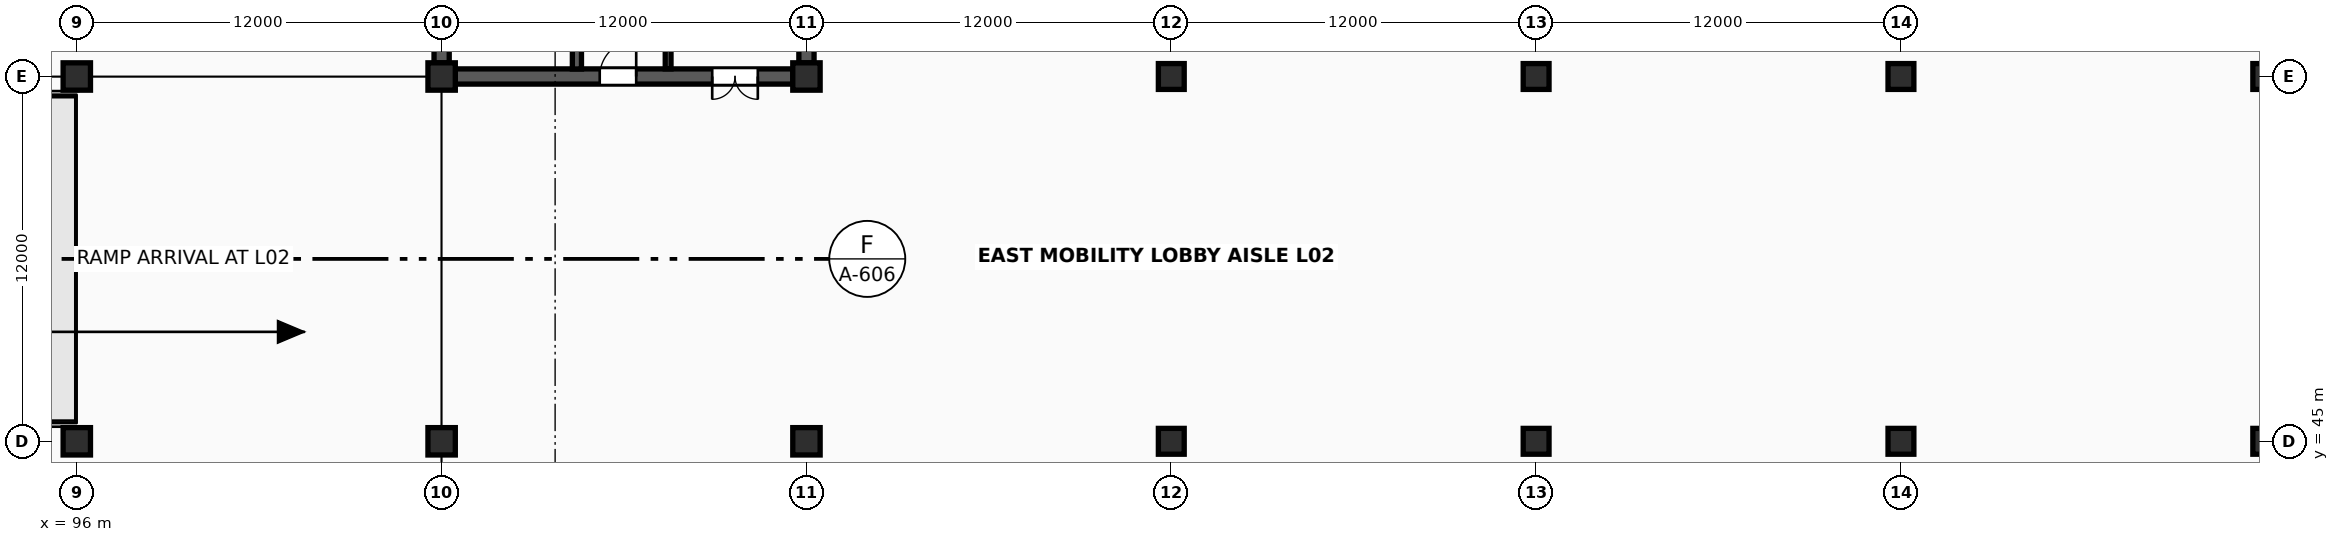
"""IFC4 building model, lengths in metres.
Left out: names, types, materials, properties, quantities, classifications, styles, units other than length and angle.
Written with IfcOpenShell. Run it as: python <this file> out.ifc"""

import sys

from ifc_helpers import new_model, si_unit, direction, frame, frame_2d, origin, origin_2d, place, context, subcontext, project, spatial, rectangle, extrude, element, fill, save


model = new_model("IFC4")
c1 = context("Model", 3, precision=1e-05, world=origin(), true_north=direction((0.0, 1.0)))
c2 = subcontext(c1, "Body", "Model", "MODEL_VIEW")
j1 = project(units=[si_unit("LENGTHUNIT", "METRE"), si_unit("PLANEANGLEUNIT", "RADIAN")], contexts=[c1])
p1 = place(None, origin())
s1 = spatial("IfcSite", under=j1, at=p1, CompositionType="ELEMENT")
p2 = place(p1, origin())
s2 = spatial("IfcBuilding", under=s1, at=p2, CompositionType="ELEMENT")
p3 = place(p2, frame((0.0, 0.0, 9.6)))
s3 = spatial("IfcBuildingStorey", under=s2, at=p3, CompositionType="ELEMENT", Elevation=9.6)
for number, where, z_axis, x_axis in (
    (1, (96.0, 45.0, 0.0), (0.0, 0.0, 1.0), (1.0, 0.0, 0.0)),
    (2, (96.0, 57.0, 0.0), (0.0, 0.0, 1.0), (1.0, 0.0, 0.0)),
    (3, (108.0, 45.0, 0.0), (0.0, 0.0, 1.0), (1.0, 0.0, 0.0)),
    (4, (108.0, 57.0, 0.0), (0.0, 0.0, 1.0), (1.0, 0.0, 0.0)),
    (5, (120.0, 45.0, 0.0), (0.0, 0.0, 1.0), (1.0, 0.0, 0.0)),
    (6, (120.0, 57.0, 0.0), (0.0, 0.0, 1.0), (1.0, 0.0, 0.0)),
):
    element("IfcColumn", number, at=place(p3, frame(where, z_axis=z_axis, x_axis=x_axis)), inside=s3, PredefinedType="COLUMN", context=c2, shape_type="SweptSolid", body=[
        extrude(rectangle(XDim=0.9, YDim=0.9, at=origin_2d()), origin(), (0.0, 0.0, 1.0), 3.8),
    ])
for number, where, z_axis, x_axis in (
    (7, (132.0, 45.0, 0.0), (0.0, 0.0, 1.0), (1.0, 0.0, 0.0)),
    (8, (132.0, 57.0, 0.0), (0.0, 0.0, 1.0), (1.0, 0.0, 0.0)),
    (9, (144.0, 45.0, 0.0), (0.0, 0.0, 1.0), (1.0, 0.0, 0.0)),
    (10, (144.0, 57.0, 0.0), (0.0, 0.0, 1.0), (1.0, 0.0, 0.0)),
    (11, (156.0, 45.0, 0.0), (0.0, 0.0, 1.0), (1.0, 0.0, 0.0)),
    (12, (156.0, 57.0, 0.0), (0.0, 0.0, 1.0), (1.0, 0.0, 0.0)),
    (13, (168.0, 45.0, 0.0), (0.0, 0.0, 1.0), (1.0, 0.0, 0.0)),
    (14, (168.0, 57.0, 0.0), (0.0, 0.0, 1.0), (1.0, 0.0, 0.0)),
):
    element("IfcColumn", number, at=place(p3, frame(where, z_axis=z_axis, x_axis=x_axis)), inside=s3, PredefinedType="COLUMN", context=c2, shape_type="SweptSolid", body=[
        extrude(rectangle(XDim=0.85, YDim=0.85, at=origin_2d()), origin(), (0.0, 0.0, 1.0), 3.8),
    ])
p4 = place(p3, frame((108.447, 57.0, 0.0), z_axis=(0.0, 0.0, 1.0), x_axis=(1.0, 0.0, 0.0)))
e15 = element("IfcWall", 15, at=p4, inside=s3, PredefinedType="SHEAR", context=c2, shape_type="SweptSolid", body=[
    extrude(rectangle(XDim=11.106, YDim=0.5, at=frame_2d((5.553, 0.0))), origin(), (0.0, 0.0, 1.0), 3.638),
])
p5 = place(p4, frame((4.753, 0.0, 0.0)))
e16 = element("IfcOpeningElement", 16, at=p5, cuts=e15, PredefinedType="OPENING", context=c2, shape_type="SweptSolid", body=[
    extrude(rectangle(XDim=1.2, YDim=2.2, at=frame_2d((0.6, 1.1))), frame((0.0, 0.265, 0.0), z_axis=(0.0, -1.0, 0.0), x_axis=(1.0, 0.0, 0.0)), (0.0, 0.0, 1.0), 0.53),
])
p6 = place(p4, frame((8.453, 0.0, 0.0)))
e17 = element("IfcOpeningElement", 17, at=p6, cuts=e15, PredefinedType="OPENING", context=c2, shape_type="SweptSolid", body=[
    extrude(rectangle(XDim=1.5, YDim=2.25, at=frame_2d((0.75, 1.125))), frame((0.0, 0.265, 0.0), z_axis=(0.0, -1.0, 0.0), x_axis=(1.0, 0.0, 0.0)), (0.0, 0.0, 1.0), 0.53),
])
for number, where, z_axis, x_axis in (
    (18, (108.0, 57.447, 0.0), (0.0, 0.0, 1.0), (0.0, 1.0, 0.0)),
    (19, (120.0, 57.447, 0.0), (0.0, 0.0, 1.0), (0.0, 1.0, 0.0)),
):
    element("IfcWall", number, at=place(p3, frame(where, z_axis=z_axis, x_axis=x_axis)), inside=s3, PredefinedType="SHEAR", context=c2, shape_type="SweptSolid", body=[
        extrude(rectangle(XDim=11.106, YDim=0.5, at=frame_2d((5.553, 0.0))), origin(), (0.0, 0.0, 1.0), 3.638),
    ])
p7 = place(p3, frame((112.45, 57.247, 0.0), z_axis=(0.0, 0.0, 1.0), x_axis=(0.0, 1.0, 0.0)))
e20 = element("IfcWall", 20, at=p7, inside=s3, PredefinedType="SHEAR", context=c2, shape_type="SweptSolid", body=[
    extrude(rectangle(XDim=11.506, YDim=0.3, at=frame_2d((5.753, 0.0))), origin(), (0.0, 0.0, 1.0), 3.638),
])
p8 = place(p7, frame((0.9, 0.0, 0.0)))
e21 = element("IfcOpeningElement", 21, at=p8, cuts=e20, PredefinedType="OPENING", context=c2, shape_type="SweptSolid", body=[
    extrude(rectangle(XDim=1.1, YDim=2.2, at=frame_2d((0.55, 1.1))), frame((0.0, 0.165, 0.0), z_axis=(0.0, -1.0, 0.0), x_axis=(1.0, 0.0, 0.0)), (0.0, 0.0, 1.0), 0.33),
])
p9 = place(p3, frame((115.45, 57.25, 0.0), z_axis=(0.0, 0.0, 1.0), x_axis=(0.0, 1.0, 0.0)))
e22 = element("IfcWall", 22, at=p9, inside=s3, PredefinedType="SOLIDWALL", context=c2, shape_type="SweptSolid", body=[
    extrude(rectangle(XDim=8.43, YDim=0.19, at=frame_2d((4.215, 0.0))), origin(), (0.0, 0.0, 1.0), 3.628),
])
p10 = place(p9, frame((3.6, 0.0, 0.0)))
e23 = element("IfcOpeningElement", 23, at=p10, cuts=e22, PredefinedType="OPENING", context=c2, shape_type="SweptSolid", body=[
    extrude(rectangle(XDim=1.04, YDim=2.18, at=frame_2d((0.52, 1.09))), frame((0.0, 0.11, 0.0), z_axis=(0.0, -1.0, 0.0), x_axis=(1.0, 0.0, 0.0)), (0.0, 0.0, 1.0), 0.22),
])
p11 = place(p5, origin())
e24 = element("IfcDoor", 24, at=p11, inside=s3, OperationType="SINGLE_SWING_RIGHT", PredefinedType="DOOR", context=c2, shape_type="SweptSolid", body=[
    extrude(rectangle(XDim=1.2, YDim=2.2, at=frame_2d((0.6, 1.1))), frame((0.0, 0.025, 0.0), z_axis=(0.0, -1.0, 0.0), x_axis=(1.0, 0.0, 0.0)), (0.0, 0.0, 1.0), 0.05),
])
fill(e16, e24)
p12 = place(p6, origin())
e25 = element("IfcDoor", 25, at=p12, inside=s3, OperationType="DOUBLE_DOOR_SINGLE_SWING", PredefinedType="DOOR", context=c2, shape_type="SweptSolid", body=[
    extrude(rectangle(XDim=1.5, YDim=2.25, at=frame_2d((0.75, 1.125))), frame((0.0, 0.025, 0.0), z_axis=(0.0, -1.0, 0.0), x_axis=(1.0, 0.0, 0.0)), (0.0, 0.0, 1.0), 0.05),
])
fill(e17, e25)
save(model, sys.argv[1])
